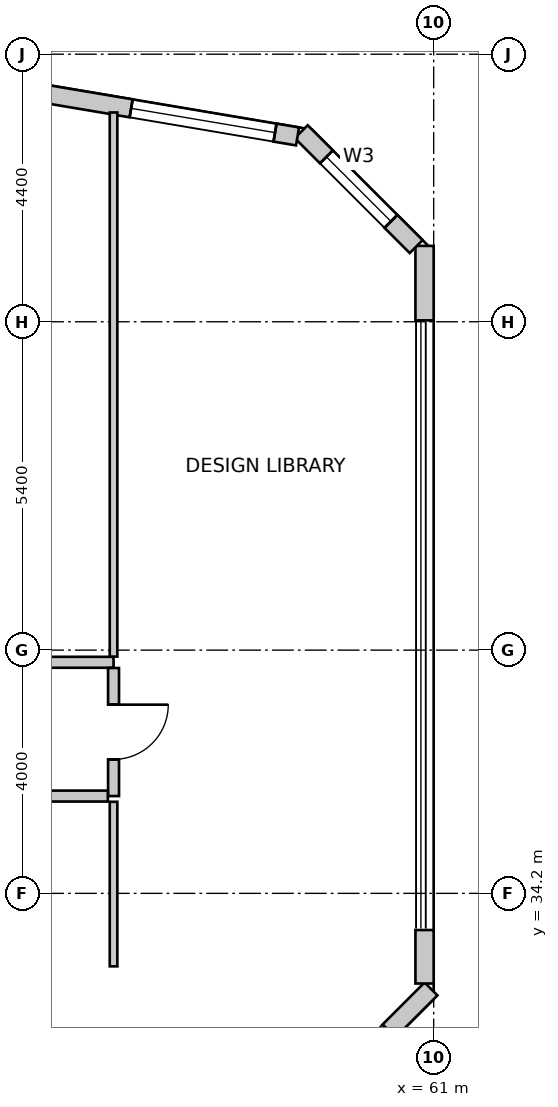
"""IFC4 building model, lengths in metres.
Left out: names, types, materials, properties, quantities, classifications, styles, units other than length and angle.
Written with IfcOpenShell. Run it as: python <this file> out.ifc"""

import sys

from ifc_helpers import new_model, si_unit, direction, frame, frame_2d, origin, place, context, subcontext, project, spatial, rectangle, extrude, source, transform, mapped, element, fill, save


model = new_model("IFC4")
c1 = context("Model", 3, precision=1e-05, world=origin(), true_north=direction((0.0, 1.0)))
c2 = subcontext(c1, "Body", "Model", "MODEL_VIEW")
j1 = project(units=[si_unit("LENGTHUNIT", "METRE"), si_unit("PLANEANGLEUNIT", "RADIAN")], contexts=[c1])
p1 = place(None, origin())
s1 = spatial("IfcSite", under=j1, at=p1, CompositionType="ELEMENT")
p2 = place(p1, origin())
s2 = spatial("IfcBuilding", under=s1, at=p2, CompositionType="ELEMENT")
p3 = place(p2, frame((0.0, 0.0, 59.0)))
s3 = spatial("IfcBuildingStorey", under=s2, at=p3, CompositionType="ELEMENT", Elevation=59.0)
p4 = place(p3, frame((57.876, 29.548, 0.0), z_axis=(0.0, 0.0, 1.0), x_axis=(0.707106781187, 0.707106781187, 0.0)))
e1 = element("IfcWall", 1, at=p4, inside=s3, PredefinedType="SOLIDWALL", context=c2, shape_type="SweptSolid", body=[
    extrude(rectangle(XDim=4.356, YDim=0.3, at=frame_2d((2.178, 0.0))), origin(), (0.0, 0.0, 1.0), 3.7),
])
m1 = source(origin(), c2, "Body", "SweptSolid", [
    extrude(rectangle(XDim=2.4, YDim=2.2, at=frame_2d((1.2, 1.1))), frame((0.0, 0.16, 0.0), z_axis=(0.0, -1.0, 0.0), x_axis=(1.0, 0.0, 0.0)), (0.0, 0.0, 1.0), 0.32),
])
p5 = place(p4, frame((0.978, 0.0, 0.85)))
e2 = element("IfcOpeningElement", 2, at=p5, cuts=e1, PredefinedType="OPENING", context=c2, shape_type="MappedRepresentation", body=[
    mapped(m1, transform((0.0, 0.0, 0.0), scale=1.0)),
])
p6 = place(p3, frame((60.85, 32.717, 0.0), z_axis=(0.0, 0.0, 1.0), x_axis=(0.0, 1.0, 0.0)))
e3 = element("IfcWall", 3, at=p6, inside=s3, PredefinedType="SOLIDWALL", context=c2, shape_type="SweptSolid", body=[
    extrude(rectangle(XDim=0.88, YDim=0.3, at=frame_2d((0.44, 0.0))), origin(), (0.0, 0.0, 1.0), 3.7),
])
p7 = place(p3, frame((60.85, 43.623, 0.0), z_axis=(0.0, 0.0, 1.0), x_axis=(0.0, 1.0, 0.0)))
e4 = element("IfcWall", 4, at=p7, inside=s3, PredefinedType="SOLIDWALL", context=c2, shape_type="SweptSolid", body=[
    extrude(rectangle(XDim=1.225, YDim=0.3, at=frame_2d((0.613, 0.0))), origin(), (0.0, 0.0, 1.0), 3.7),
])
p8 = place(p3, frame((60.712, 44.836, 0.0), z_axis=(0.0, 0.0, 1.0), x_axis=(-0.707106781187, 0.707106781187, 0.0)))
e5 = element("IfcWall", 5, at=p8, inside=s3, PredefinedType="SOLIDWALL", context=c2, shape_type="SweptSolid", body=[
    extrude(rectangle(XDim=2.673, YDim=0.3, at=frame_2d((1.336, 0.0))), origin(), (0.0, 0.0, 1.0), 3.7),
])
m2 = source(origin(), c2, "Body", "SweptSolid", [
    extrude(rectangle(XDim=1.5, YDim=1.8, at=frame_2d((0.75, 0.9))), frame((0.0, 0.16, 0.0), z_axis=(0.0, -1.0, 0.0), x_axis=(1.0, 0.0, 0.0)), (0.0, 0.0, 1.0), 0.32),
])
p9 = place(p8, frame((0.587, 0.0, 0.85)))
e6 = element("IfcOpeningElement", 6, at=p9, cuts=e5, PredefinedType="OPENING", context=c2, shape_type="MappedRepresentation", body=[
    mapped(m2, transform((0.0, 0.0, 0.0), scale=1.0)),
])
p10 = place(p3, frame((58.761, 46.648, 0.0), z_axis=(0.0, 0.0, 1.0), x_axis=(-0.98607502735, 0.166301053624, 0.0)))
e7 = element("IfcWall", 7, at=p10, inside=s3, PredefinedType="SOLIDWALL", context=c2, shape_type="SweptSolid", body=[
    extrude(rectangle(XDim=37.397, YDim=0.3, at=frame_2d((18.699, 0.0))), origin(), (0.0, 0.0, 1.0), 3.7),
])
p11 = place(p10, frame((0.375, 0.0, 0.85)))
e8 = element("IfcOpeningElement", 8, at=p11, cuts=e7, PredefinedType="OPENING", context=c2, shape_type="MappedRepresentation", body=[
    mapped(m1, transform((0.0, 0.0, 0.0), scale=1.0)),
])
m3 = source(origin(), c2, "Body", "SweptSolid", [
    extrude(rectangle(XDim=2.8, YDim=2.4, at=frame_2d((1.4, 1.2))), frame((0.0, 0.16, 0.0), z_axis=(0.0, -1.0, 0.0), x_axis=(1.0, 0.0, 0.0)), (0.0, 0.0, 1.0), 0.32),
])
p12 = place(p10, frame((5.357, 0.0, 0.85)))
e9 = element("IfcOpeningElement", 9, at=p12, cuts=e7, PredefinedType="OPENING", context=c2, shape_type="MappedRepresentation", body=[
    mapped(m3, transform((0.0, 0.0, 0.0), scale=1.0)),
])
p13 = place(p10, frame((12.772, 0.0, 0.85)))
e10 = element("IfcOpeningElement", 10, at=p13, cuts=e7, PredefinedType="OPENING", context=c2, shape_type="MappedRepresentation", body=[
    mapped(m3, transform((0.0, 0.0, 0.0), scale=1.0)),
])
p14 = place(p10, frame((19.194, 0.0, 0.85)))
e11 = element("IfcOpeningElement", 11, at=p14, cuts=e7, PredefinedType="OPENING", context=c2, shape_type="MappedRepresentation", body=[
    mapped(m3, transform((0.0, 0.0, 0.0), scale=1.0)),
])
p15 = place(p10, frame((24.384, 0.0, 0.85)))
e12 = element("IfcOpeningElement", 12, at=p15, cuts=e7, PredefinedType="OPENING", context=c2, shape_type="MappedRepresentation", body=[
    mapped(m1, transform((0.0, 0.0, 0.0), scale=1.0)),
])
p16 = place(p10, frame((29.757, 0.0, 0.85)))
e13 = element("IfcOpeningElement", 13, at=p16, cuts=e7, PredefinedType="OPENING", context=c2, shape_type="MappedRepresentation", body=[
    mapped(m3, transform((0.0, 0.0, 0.0), scale=1.0)),
])
p17 = place(p10, frame((34.256, 0.0, 0.85)))
e14 = element("IfcOpeningElement", 14, at=p17, cuts=e7, PredefinedType="OPENING", context=c2, shape_type="MappedRepresentation", body=[
    mapped(m3, transform((0.0, 0.0, 0.0), scale=1.0)),
])
p18 = place(p3, frame((48.585, 38.0, 0.0), z_axis=(0.0, 0.0, 1.0), x_axis=(1.0, 0.0, 0.0)))
e15 = element("IfcWall", 15, at=p18, inside=s3, PredefinedType="PARTITIONING", context=c2, shape_type="SweptSolid", body=[
    extrude(rectangle(XDim=7.15, YDim=0.18, at=frame_2d((3.575, 0.0))), origin(), (0.0, 0.0, 1.0), 3.7),
])
m4 = source(origin(), c2, "Body", "SweptSolid", [
    extrude(rectangle(XDim=0.9, YDim=2.15, at=frame_2d((0.45, 1.075))), frame((0.0, 0.1, 0.0), z_axis=(0.0, -1.0, 0.0), x_axis=(1.0, 0.0, 0.0)), (0.0, 0.0, 1.0), 0.2),
])
p19 = place(p18, frame((3.064, 0.0, 0.0)))
e16 = element("IfcOpeningElement", 16, at=p19, cuts=e15, PredefinedType="OPENING", context=c2, shape_type="MappedRepresentation", body=[
    mapped(m4, transform((0.0, 0.0, 0.0), scale=1.0)),
])
p20 = place(p3, frame((55.735, 37.906, 0.0), z_axis=(0.0, 0.0, 1.0), x_axis=(0.0, -1.0, 0.0)))
e17 = element("IfcWall", 17, at=p20, inside=s3, PredefinedType="PARTITIONING", context=c2, shape_type="SweptSolid", body=[
    extrude(rectangle(XDim=2.106, YDim=0.18, at=frame_2d((1.053, 0.0))), origin(), (0.0, 0.0, 1.0), 3.7),
])
p21 = place(p20, frame((0.603, 0.0, 0.0)))
e18 = element("IfcOpeningElement", 18, at=p21, cuts=e17, PredefinedType="OPENING", context=c2, shape_type="MappedRepresentation", body=[
    mapped(m4, transform((0.0, 0.0, 0.0), scale=1.0)),
])
p22 = place(p3, frame((55.641, 35.8, 0.0), z_axis=(0.0, 0.0, 1.0), x_axis=(-1.0, 0.0, 0.0)))
e19 = element("IfcWall", 19, at=p22, inside=s3, PredefinedType="PARTITIONING", context=c2, shape_type="SweptSolid", body=[
    extrude(rectangle(XDim=21.841, YDim=0.18, at=frame_2d((10.92, 0.0))), origin(), (0.0, 0.0, 1.0), 2.742),
])
p23 = place(p22, frame((10.531, 0.0, 0.0)))
e20 = element("IfcOpeningElement", 20, at=p23, cuts=e19, PredefinedType="OPENING", context=c2, shape_type="MappedRepresentation", body=[
    mapped(m4, transform((0.0, 0.0, 0.0), scale=1.0)),
])
p24 = place(p3, frame((55.735, 47.042, 0.0), z_axis=(0.0, 0.0, 1.0), x_axis=(0.0, -1.0, 0.0)))
e21 = element("IfcWall", 21, at=p24, inside=s3, PredefinedType="PARTITIONING", context=c2, shape_type="SweptSolid", body=[
    extrude(rectangle(XDim=8.948, YDim=0.125, at=frame_2d((4.474, 0.0))), origin(), (0.0, 0.0, 1.0), 3.7),
])
p25 = place(p3, frame((55.735, 33.0, 0.0), z_axis=(0.0, 0.0, 1.0), x_axis=(0.0, 1.0, 0.0)))
e22 = element("IfcWall", 22, at=p25, inside=s3, PredefinedType="PARTITIONING", context=c2, shape_type="SweptSolid", body=[
    extrude(rectangle(XDim=2.706, YDim=0.125, at=frame_2d((1.353, 0.0))), origin(), (0.0, 0.0, 1.0), 3.7),
])
m5 = source(origin(), c2, "Body", "SweptSolid", [
    extrude(rectangle(XDim=1.5, YDim=1.8, at=frame_2d((0.75, 0.9))), frame((0.0, -0.015, 0.0), z_axis=(0.0, -1.0, 0.0), x_axis=(1.0, 0.0, 0.0)), (0.0, 0.0, 1.0), 0.06),
])
p26 = place(p9, origin())
e23 = element("IfcWindow", 23, at=p26, inside=s3, PartitioningType="SINGLE_PANEL", PredefinedType="WINDOW", context=c2, shape_type="MappedRepresentation", body=[
    mapped(m5, transform((0.0, 0.0, 0.0), scale=1.0)),
])
fill(e6, e23)
m6 = source(origin(), c2, "Body", "SweptSolid", [
    extrude(rectangle(XDim=2.4, YDim=2.2, at=frame_2d((1.2, 1.1))), frame((0.0, -0.015, 0.0), z_axis=(0.0, -1.0, 0.0), x_axis=(1.0, 0.0, 0.0)), (0.0, 0.0, 1.0), 0.06),
])
p27 = place(p11, origin())
e24 = element("IfcWindow", 24, at=p27, inside=s3, PartitioningType="SINGLE_PANEL", PredefinedType="WINDOW", context=c2, shape_type="MappedRepresentation", body=[
    mapped(m6, transform((0.0, 0.0, 0.0), scale=1.0)),
])
fill(e8, e24)
m7 = source(origin(), c2, "Body", "SweptSolid", [
    extrude(rectangle(XDim=0.9, YDim=2.15, at=frame_2d((0.45, 1.075))), frame((0.0, 0.025, 0.0), z_axis=(0.0, -1.0, 0.0), x_axis=(1.0, 0.0, 0.0)), (0.0, 0.0, 1.0), 0.05),
])
p28 = place(p21, origin())
e25 = element("IfcDoor", 25, at=p28, inside=s3, OperationType="SINGLE_SWING_LEFT", PredefinedType="DOOR", context=c2, shape_type="MappedRepresentation", body=[
    mapped(m7, transform((0.0, 0.0, 0.0), scale=1.0)),
])
fill(e18, e25)
save(model, sys.argv[1])
